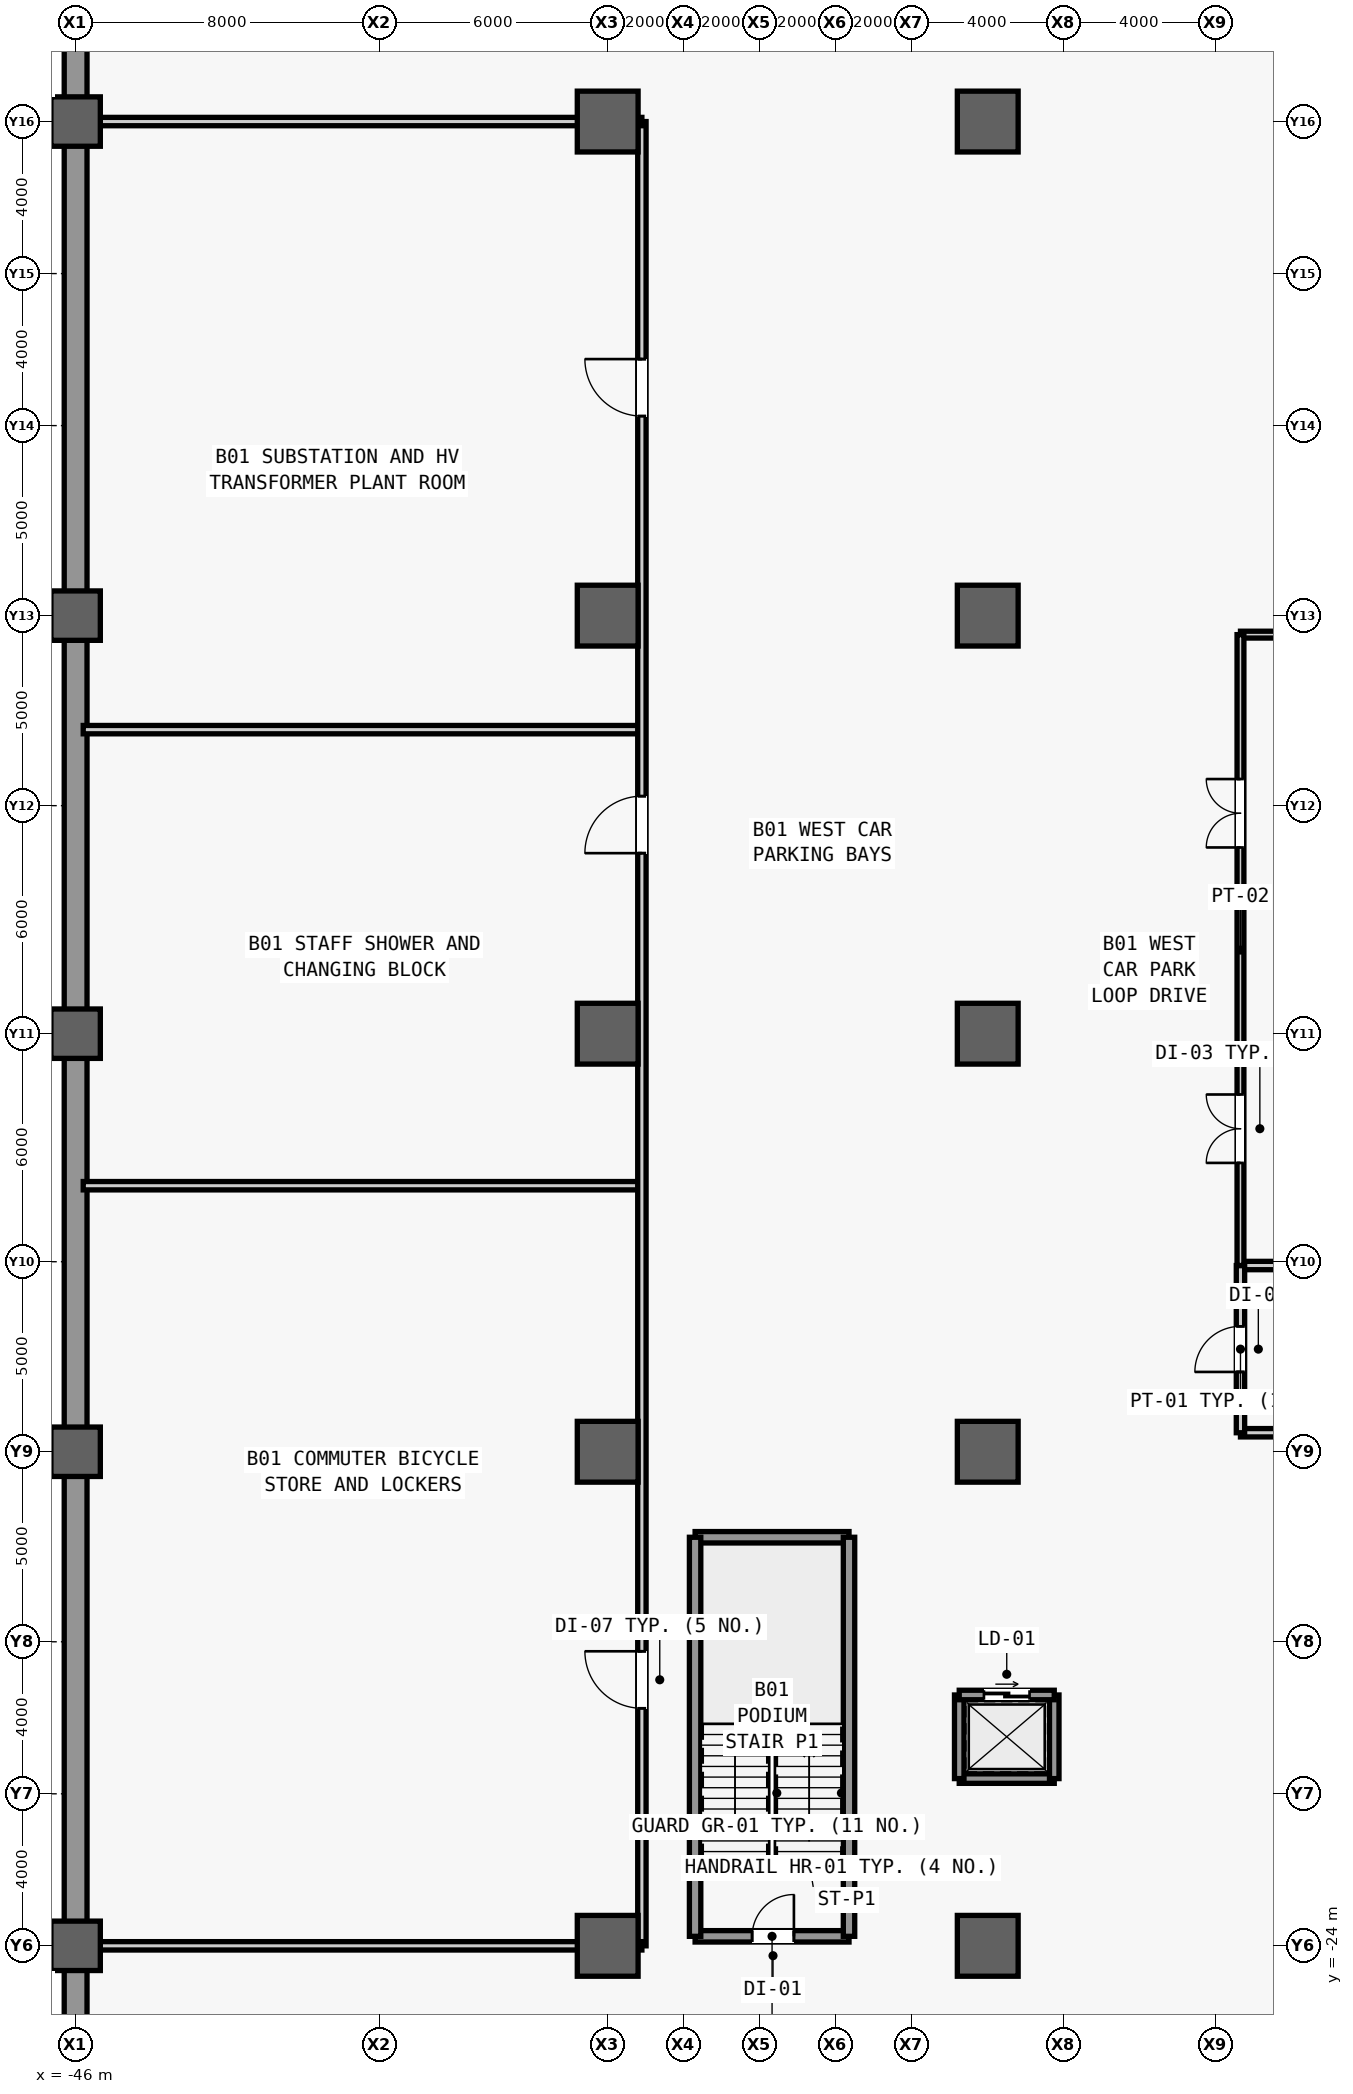
"""IFC4 building model, lengths in metres.
Left out: names, types, materials, properties, quantities, classifications, styles, units other than length and angle.
Written with IfcOpenShell. Run it as: python <this file> out.ifc"""

import sys

from ifc_helpers import new_model, si_unit, direction, frame, frame_2d, origin, origin_2d, place, context, subcontext, project, spatial, rectangle, extrude, source, transform, mapped, element, fill, save


model = new_model("IFC4")
c1 = context("Model", 3, precision=1e-05, world=origin(), true_north=direction((0.0, 1.0)))
c2 = subcontext(c1, "Body", "Model", "MODEL_VIEW")
j1 = project(units=[si_unit("LENGTHUNIT", "METRE"), si_unit("PLANEANGLEUNIT", "RADIAN")], contexts=[c1])
p1 = place(None, origin())
s1 = spatial("IfcSite", under=j1, at=p1, CompositionType="ELEMENT")
p2 = place(p1, origin())
s2 = spatial("IfcBuilding", under=s1, at=p2, CompositionType="ELEMENT")
p3 = place(p2, frame((0.0, 0.0, -4.8)))
s3 = spatial("IfcBuildingStorey", under=s2, at=p3, CompositionType="ELEMENT", Elevation=-4.8)
m1 = source(origin(), c2, "Body", "SweptSolid", [
    extrude(rectangle(XDim=74.8, YDim=0.6, at=frame_2d((37.4, 0.0))), origin(), (0.0, 0.0, 1.0), 4.48),
])
p4 = place(p3, frame((-46.0, -37.4, 0.0), z_axis=(0.0, 0.0, 1.0), x_axis=(0.0, 1.0, 0.0)))
e1 = element("IfcWall", 1, at=p4, inside=s3, PredefinedType="USERDEFINED", context=c2, shape_type="MappedRepresentation", body=[
    mapped(m1, transform((0.0, 0.0, 0.0), scale=1.0)),
])
m2 = source(origin(), c2, "Body", "SweptSolid", [
    extrude(rectangle(XDim=1.3, YDim=1.3, at=origin_2d()), origin(), (0.0, 0.0, 1.0), 4.8),
])
for number, where, z_axis, x_axis in (
    (2, (-46.0, -24.0, 0.0), (0.0, 0.0, 1.0), (1.0, 0.0, 0.0)),
    (3, (-46.0, -11.0, 0.0), (0.0, 0.0, 1.0), (1.0, 0.0, 0.0)),
    (4, (-46.0, 0.0, 0.0), (0.0, 0.0, 1.0), (1.0, 0.0, 0.0)),
    (5, (-46.0, 11.0, 0.0), (0.0, 0.0, 1.0), (1.0, 0.0, 0.0)),
    (6, (-46.0, 24.0, 0.0), (0.0, 0.0, 1.0), (1.0, 0.0, 0.0)),
):
    element("IfcColumn", number, at=place(p3, frame(where, z_axis=z_axis, x_axis=x_axis)), inside=s3, PredefinedType="COLUMN", context=c2, shape_type="MappedRepresentation", body=[
        mapped(m2, transform((0.0, 0.0, 0.0), scale=1.0)),
    ])
m3 = source(origin(), c2, "Body", "SweptSolid", [
    extrude(rectangle(XDim=1.6, YDim=1.6, at=origin_2d()), origin(), (0.0, 0.0, 1.0), 4.8),
])
for number, where, z_axis, x_axis in (
    (7, (-32.0, -24.0, 0.0), (0.0, 0.0, 1.0), (1.0, 0.0, 0.0)),
    (8, (-32.0, -11.0, 0.0), (0.0, 0.0, 1.0), (1.0, 0.0, 0.0)),
    (9, (-32.0, 0.0, 0.0), (0.0, 0.0, 1.0), (1.0, 0.0, 0.0)),
    (10, (-32.0, 11.0, 0.0), (0.0, 0.0, 1.0), (1.0, 0.0, 0.0)),
    (11, (-32.0, 24.0, 0.0), (0.0, 0.0, 1.0), (1.0, 0.0, 0.0)),
    (12, (-22.0, -24.0, 0.0), (0.0, 0.0, 1.0), (1.0, 0.0, 0.0)),
    (13, (-22.0, -11.0, 0.0), (0.0, 0.0, 1.0), (1.0, 0.0, 0.0)),
    (14, (-22.0, 0.0, 0.0), (0.0, 0.0, 1.0), (1.0, 0.0, 0.0)),
    (15, (-22.0, 11.0, 0.0), (0.0, 0.0, 1.0), (1.0, 0.0, 0.0)),
    (16, (-22.0, 24.0, 0.0), (0.0, 0.0, 1.0), (1.0, 0.0, 0.0)),
):
    element("IfcColumn", number, at=place(p3, frame(where, z_axis=z_axis, x_axis=x_axis)), inside=s3, PredefinedType="COLUMN", context=c2, shape_type="MappedRepresentation", body=[
        mapped(m3, transform((0.0, 0.0, 0.0), scale=1.0)),
    ])
m4 = source(origin(), c2, "Body", "SweptSolid", [
    extrude(rectangle(XDim=4.05, YDim=0.22, at=frame_2d((2.025, 0.0))), origin(), (0.0, 0.0, 1.0), 4.48),
])
for number, where, z_axis, x_axis in (
    (17, (-15.35, -10.5, 0.0), (0.0, 0.0, 1.0), (1.0, 0.0, 0.0)),
    (18, (-15.35, -6.1, 0.0), (0.0, 0.0, 1.0), (1.0, 0.0, 0.0)),
):
    element("IfcWall", number, at=place(p3, frame(where, z_axis=z_axis, x_axis=x_axis)), inside=s3, PredefinedType="PARTITIONING", context=c2, shape_type="MappedRepresentation", body=[
        mapped(m4, transform((0.0, 0.0, 0.0), scale=1.0)),
    ])
m5 = source(origin(), c2, "Body", "SweptSolid", [
    extrude(rectangle(XDim=4.4, YDim=0.22, at=frame_2d((2.2, 0.0))), origin(), (0.0, 0.0, 1.0), 4.48),
])
p5 = place(p3, frame((-15.35, -10.5, 0.0), z_axis=(0.0, 0.0, 1.0), x_axis=(0.0, 1.0, 0.0)))
e19 = element("IfcWall", 19, at=p5, inside=s3, PredefinedType="PARTITIONING", context=c2, shape_type="MappedRepresentation", body=[
    mapped(m5, transform((0.0, 0.0, 0.0), scale=1.0)),
])
m6 = source(origin(), c2, "Body", "SweptSolid", [
    extrude(rectangle(XDim=1.2, YDim=2.2, at=frame_2d((0.6, 1.1))), frame((0.0, 0.12, 0.0), z_axis=(0.0, -1.0, 0.0), x_axis=(1.0, 0.0, 0.0)), (0.0, 0.0, 1.0), 0.24),
])
p6 = place(p5, frame((1.6, 0.0, 0.0)))
e20 = element("IfcOpeningElement", 20, at=p6, cuts=e19, PredefinedType="OPENING", context=c2, shape_type="MappedRepresentation", body=[
    mapped(m6, transform((0.0, 0.0, 0.0), scale=1.0)),
])
m7 = source(origin(), c2, "Body", "SweptSolid", [
    extrude(rectangle(XDim=4.05, YDim=0.18, at=frame_2d((2.025, 0.0))), origin(), (0.0, 0.0, 1.0), 4.48),
])
p7 = place(p3, frame((-15.35, 10.5, 0.0), z_axis=(0.0, 0.0, 1.0), x_axis=(1.0, 0.0, 0.0)))
e21 = element("IfcWall", 21, at=p7, inside=s3, PredefinedType="PARTITIONING", context=c2, shape_type="MappedRepresentation", body=[
    mapped(m7, transform((0.0, 0.0, 0.0), scale=1.0)),
])
m8 = source(origin(), c2, "Body", "SweptSolid", [
    extrude(rectangle(XDim=16.6, YDim=0.18, at=frame_2d((8.3, 0.0))), origin(), (0.0, 0.0, 1.0), 4.48),
])
p8 = place(p3, frame((-15.35, -6.1, 0.0), z_axis=(0.0, 0.0, 1.0), x_axis=(0.0, 1.0, 0.0)))
e22 = element("IfcWall", 22, at=p8, inside=s3, PredefinedType="PARTITIONING", context=c2, shape_type="MappedRepresentation", body=[
    mapped(m8, transform((0.0, 0.0, 0.0), scale=1.0)),
])
m9 = source(origin(), c2, "Body", "SweptSolid", [
    extrude(rectangle(XDim=1.8, YDim=2.25, at=frame_2d((0.9, 1.125))), frame((0.0, 0.1, 0.0), z_axis=(0.0, -1.0, 0.0), x_axis=(1.0, 0.0, 0.0)), (0.0, 0.0, 1.0), 0.2),
])
p9 = place(p8, frame((2.7, 0.0, 0.0)))
e23 = element("IfcOpeningElement", 23, at=p9, cuts=e22, PredefinedType="OPENING", context=c2, shape_type="MappedRepresentation", body=[
    mapped(m9, transform((0.0, 0.0, 0.0), scale=1.0)),
])
p10 = place(p8, frame((11.0, 0.0, 0.0)))
e24 = element("IfcOpeningElement", 24, at=p10, cuts=e22, PredefinedType="OPENING", context=c2, shape_type="MappedRepresentation", body=[
    mapped(m9, transform((0.0, 0.0, 0.0), scale=1.0)),
])
m10 = source(origin(), c2, "Body", "SweptSolid", [
    extrude(rectangle(XDim=4.05, YDim=0.3, at=frame_2d((2.025, 0.0))), origin(), (0.0, 0.0, 1.0), 4.48),
])
p11 = place(p3, frame((-29.7, -23.75, 0.0), z_axis=(0.0, 0.0, 1.0), x_axis=(1.0, 0.0, 0.0)))
e25 = element("IfcWall", 25, at=p11, inside=s3, PredefinedType="SHEAR", context=c2, shape_type="MappedRepresentation", body=[
    mapped(m10, transform((0.0, 0.0, 0.0), scale=1.0)),
])
m11 = source(origin(), c2, "Body", "SweptSolid", [
    extrude(rectangle(XDim=1.1, YDim=2.2, at=frame_2d((0.55, 1.1))), frame((0.0, 0.16, 0.0), z_axis=(0.0, -1.0, 0.0), x_axis=(1.0, 0.0, 0.0)), (0.0, 0.0, 1.0), 0.32),
])
p12 = place(p11, frame((1.5, 0.0, 0.0)))
e26 = element("IfcOpeningElement", 26, at=p12, cuts=e25, PredefinedType="OPENING", context=c2, shape_type="MappedRepresentation", body=[
    mapped(m11, transform((0.0, 0.0, 0.0), scale=1.0)),
])
p13 = place(p3, frame((-29.7, -13.25, 0.0), z_axis=(0.0, 0.0, 1.0), x_axis=(1.0, 0.0, 0.0)))
e27 = element("IfcWall", 27, at=p13, inside=s3, PredefinedType="SHEAR", context=c2, shape_type="MappedRepresentation", body=[
    mapped(m10, transform((0.0, 0.0, 0.0), scale=1.0)),
])
m12 = source(origin(), c2, "Body", "SweptSolid", [
    extrude(rectangle(XDim=10.5, YDim=0.3, at=frame_2d((5.25, 0.0))), origin(), (0.0, 0.0, 1.0), 4.48),
])
for number, where, z_axis, x_axis in (
    (28, (-29.7, -23.75, 0.0), (0.0, 0.0, 1.0), (0.0, 1.0, 0.0)),
    (29, (-25.65, -23.75, 0.0), (0.0, 0.0, 1.0), (0.0, 1.0, 0.0)),
):
    element("IfcWall", number, at=place(p3, frame(where, z_axis=z_axis, x_axis=x_axis)), inside=s3, PredefinedType="SHEAR", context=c2, shape_type="MappedRepresentation", body=[
        mapped(m12, transform((0.0, 0.0, 0.0), scale=1.0)),
    ])
m13 = source(origin(), c2, "Body", "SweptSolid", [
    extrude(rectangle(XDim=2.5, YDim=0.25, at=frame_2d((1.25, 0.0))), origin(), (0.0, 0.0, 1.0), 4.48),
])
p14 = place(p3, frame((-22.75, -19.6, 0.0), z_axis=(0.0, 0.0, 1.0), x_axis=(1.0, 0.0, 0.0)))
e30 = element("IfcWall", 30, at=p14, inside=s3, PredefinedType="SHEAR", context=c2, shape_type="MappedRepresentation", body=[
    mapped(m13, transform((0.0, 0.0, 0.0), scale=1.0)),
])
m14 = source(origin(), c2, "Body", "SweptSolid", [
    extrude(rectangle(XDim=2.2, YDim=0.25, at=frame_2d((1.1, 0.0))), origin(), (0.0, 0.0, 1.0), 4.48),
])
for number, where, z_axis, x_axis in (
    (31, (-22.75, -19.6, 0.0), (0.0, 0.0, 1.0), (0.0, 1.0, 0.0)),
    (32, (-20.25, -19.6, 0.0), (0.0, 0.0, 1.0), (0.0, 1.0, 0.0)),
):
    element("IfcWall", number, at=place(p3, frame(where, z_axis=z_axis, x_axis=x_axis)), inside=s3, PredefinedType="SHEAR", context=c2, shape_type="MappedRepresentation", body=[
        mapped(m14, transform((0.0, 0.0, 0.0), scale=1.0)),
    ])
p15 = place(p3, frame((-22.75, -17.4, 0.0), z_axis=(0.0, 0.0, 1.0), x_axis=(1.0, 0.0, 0.0)))
e33 = element("IfcWall", 33, at=p15, inside=s3, PredefinedType="SHEAR", context=c2, shape_type="MappedRepresentation", body=[
    mapped(m13, transform((0.0, 0.0, 0.0), scale=1.0)),
])
m15 = source(origin(), c2, "Body", "SweptSolid", [
    extrude(rectangle(XDim=1.2, YDim=2.3, at=frame_2d((0.6, 1.15))), frame((0.0, 0.135, 0.0), z_axis=(0.0, -1.0, 0.0), x_axis=(1.0, 0.0, 0.0)), (0.0, 0.0, 1.0), 0.27),
])
p16 = place(p15, frame((0.65, 0.0, 0.0)))
e34 = element("IfcOpeningElement", 34, at=p16, cuts=e33, PredefinedType="OPENING", context=c2, shape_type="MappedRepresentation", body=[
    mapped(m15, transform((0.0, 0.0, 0.0), scale=1.0)),
])
m16 = source(origin(), c2, "Body", "SweptSolid", [
    extrude(rectangle(XDim=14.7, YDim=0.22, at=frame_2d((7.35, 0.0))), origin(), (0.0, 0.0, 1.0), 4.48),
])
for number, where, z_axis, x_axis in (
    (35, (-45.8, -4.0, 0.0), (0.0, 0.0, 1.0), (1.0, 0.0, 0.0)),
    (36, (-45.8, 8.0, 0.0), (0.0, 0.0, 1.0), (1.0, 0.0, 0.0)),
):
    element("IfcWall", number, at=place(p3, frame(where, z_axis=z_axis, x_axis=x_axis)), inside=s3, PredefinedType="PARTITIONING", context=c2, shape_type="MappedRepresentation", body=[
        mapped(m16, transform((0.0, 0.0, 0.0), scale=1.0)),
    ])
m17 = source(origin(), c2, "Body", "SweptSolid", [
    extrude(rectangle(XDim=48.0, YDim=0.22, at=frame_2d((24.0, 0.0))), origin(), (0.0, 0.0, 1.0), 4.48),
])
p17 = place(p3, frame((-31.1, -24.0, 0.0), z_axis=(0.0, 0.0, 1.0), x_axis=(0.0, 1.0, 0.0)))
e37 = element("IfcWall", 37, at=p17, inside=s3, PredefinedType="PARTITIONING", context=c2, shape_type="MappedRepresentation", body=[
    mapped(m17, transform((0.0, 0.0, 0.0), scale=1.0)),
])
m18 = source(origin(), c2, "Body", "SweptSolid", [
    extrude(rectangle(XDim=1.5, YDim=2.3, at=frame_2d((0.75, 1.15))), frame((0.0, 0.12, 0.0), z_axis=(0.0, -1.0, 0.0), x_axis=(1.0, 0.0, 0.0)), (0.0, 0.0, 1.0), 0.24),
])
p18 = place(p17, frame((6.25, 0.0, 0.0)))
e38 = element("IfcOpeningElement", 38, at=p18, cuts=e37, PredefinedType="OPENING", context=c2, shape_type="MappedRepresentation", body=[
    mapped(m18, transform((0.0, 0.0, 0.0), scale=1.0)),
])
p19 = place(p17, frame((28.75, 0.0, 0.0)))
e39 = element("IfcOpeningElement", 39, at=p19, cuts=e37, PredefinedType="OPENING", context=c2, shape_type="MappedRepresentation", body=[
    mapped(m18, transform((0.0, 0.0, 0.0), scale=1.0)),
])
p20 = place(p17, frame((40.25, 0.0, 0.0)))
e40 = element("IfcOpeningElement", 40, at=p20, cuts=e37, PredefinedType="OPENING", context=c2, shape_type="MappedRepresentation", body=[
    mapped(m18, transform((0.0, 0.0, 0.0), scale=1.0)),
])
m19 = source(origin(), c2, "Body", "SweptSolid", [
    extrude(rectangle(XDim=14.7, YDim=0.22, at=frame_2d((7.35, 0.0))), origin(), (0.0, 0.0, 1.0), 2.68),
])
for number, where, z_axis, x_axis in (
    (41, (-45.8, -24.0, 0.0), (0.0, 0.0, 1.0), (1.0, 0.0, 0.0)),
    (42, (-45.8, 24.0, 0.0), (0.0, 0.0, 1.0), (1.0, 0.0, 0.0)),
):
    element("IfcWall", number, at=place(p3, frame(where, z_axis=z_axis, x_axis=x_axis)), inside=s3, PredefinedType="PARTITIONING", context=c2, shape_type="MappedRepresentation", body=[
        mapped(m19, transform((0.0, 0.0, 0.0), scale=1.0)),
    ])
m20 = source(origin(), c2, "Body", "SweptSolid", [
    extrude(rectangle(XDim=1.2, YDim=2.2, at=frame_2d((0.6, 1.1))), frame((0.0, 0.025, 0.0), z_axis=(0.0, -1.0, 0.0), x_axis=(1.0, 0.0, 0.0)), (0.0, 0.0, 1.0), 0.05),
])
p21 = place(p6, origin())
e43 = element("IfcDoor", 43, at=p21, inside=s3, OperationType="SINGLE_SWING_LEFT", PredefinedType="DOOR", context=c2, shape_type="MappedRepresentation", body=[
    mapped(m20, transform((0.0, 0.0, 0.0), scale=1.0)),
])
fill(e20, e43)
m21 = source(origin(), c2, "Body", "SweptSolid", [
    extrude(rectangle(XDim=1.8, YDim=2.25, at=frame_2d((0.9, 1.125))), frame((0.0, 0.025, 0.0), z_axis=(0.0, -1.0, 0.0), x_axis=(1.0, 0.0, 0.0)), (0.0, 0.0, 1.0), 0.05),
])
p22 = place(p9, origin())
e44 = element("IfcDoor", 44, at=p22, inside=s3, OperationType="SINGLE_SWING_LEFT", PredefinedType="DOOR", context=c2, shape_type="MappedRepresentation", body=[
    mapped(m21, transform((0.0, 0.0, 0.0), scale=1.0)),
])
fill(e23, e44)
p23 = place(p10, origin())
e45 = element("IfcDoor", 45, at=p23, inside=s3, OperationType="SINGLE_SWING_RIGHT", PredefinedType="DOOR", context=c2, shape_type="MappedRepresentation", body=[
    mapped(m21, transform((0.0, 0.0, 0.0), scale=1.0)),
])
fill(e24, e45)
m22 = source(origin(), c2, "Body", "SweptSolid", [
    extrude(rectangle(XDim=1.1, YDim=2.2, at=frame_2d((0.55, 1.1))), frame((0.0, 0.025, 0.0), z_axis=(0.0, -1.0, 0.0), x_axis=(1.0, 0.0, 0.0)), (0.0, 0.0, 1.0), 0.05),
])
p24 = place(p12, origin())
e46 = element("IfcDoor", 46, at=p24, inside=s3, OperationType="SINGLE_SWING_RIGHT", PredefinedType="DOOR", context=c2, shape_type="MappedRepresentation", body=[
    mapped(m22, transform((0.0, 0.0, 0.0), scale=1.0)),
])
fill(e26, e46)
m23 = source(origin(), c2, "Body", "SweptSolid", [
    extrude(rectangle(XDim=1.5, YDim=2.3, at=frame_2d((0.75, 1.15))), frame((0.0, 0.025, 0.0), z_axis=(0.0, -1.0, 0.0), x_axis=(1.0, 0.0, 0.0)), (0.0, 0.0, 1.0), 0.05),
])
p25 = place(p18, origin())
e47 = element("IfcDoor", 47, at=p25, inside=s3, OperationType="SINGLE_SWING_RIGHT", PredefinedType="DOOR", context=c2, shape_type="MappedRepresentation", body=[
    mapped(m23, transform((0.0, 0.0, 0.0), scale=1.0)),
])
fill(e38, e47)
p26 = place(p19, origin())
e48 = element("IfcDoor", 48, at=p26, inside=s3, OperationType="SINGLE_SWING_LEFT", PredefinedType="DOOR", context=c2, shape_type="MappedRepresentation", body=[
    mapped(m23, transform((0.0, 0.0, 0.0), scale=1.0)),
])
fill(e39, e48)
p27 = place(p20, origin())
e49 = element("IfcDoor", 49, at=p27, inside=s3, OperationType="SINGLE_SWING_RIGHT", PredefinedType="DOOR", context=c2, shape_type="MappedRepresentation", body=[
    mapped(m23, transform((0.0, 0.0, 0.0), scale=1.0)),
])
fill(e40, e49)
m24 = source(origin(), c2, "Body", "SweptSolid", [
    extrude(rectangle(XDim=1.2, YDim=2.3, at=frame_2d((0.6, 1.15))), frame((0.0, 0.025, 0.0), z_axis=(0.0, -1.0, 0.0), x_axis=(1.0, 0.0, 0.0)), (0.0, 0.0, 1.0), 0.05),
])
p28 = place(p16, origin())
e50 = element("IfcDoor", 50, at=p28, inside=s3, OperationType="SLIDING_TO_LEFT", PredefinedType="DOOR", context=c2, shape_type="MappedRepresentation", body=[
    mapped(m24, transform((0.0, 0.0, 0.0), scale=1.0)),
])
fill(e34, e50)
save(model, sys.argv[1])
